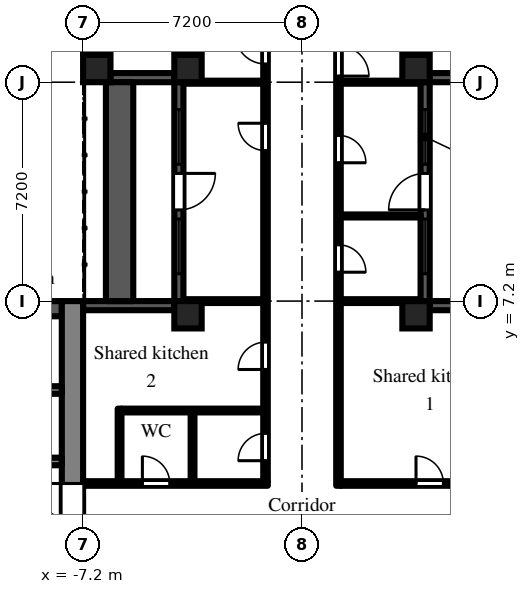
"""IFC4 building model, lengths in metres.
Left out: names, types, materials, properties, quantities, classifications, styles, units other than length and angle.
Written with IfcOpenShell. Run it as: python <this file> out.ifc"""

import sys

from ifc_helpers import new_model, si_unit, direction, frame, frame_2d, origin, origin_2d, place, context, subcontext, project, spatial, rectangle, extrude, element, fill, save


model = new_model("IFC4")
c1 = context("Model", 3, precision=1e-05, world=origin(), true_north=direction((0.0, 1.0)))
c2 = subcontext(c1, "Body", "Model", "MODEL_VIEW")
j1 = project(units=[si_unit("LENGTHUNIT", "METRE"), si_unit("PLANEANGLEUNIT", "RADIAN")], contexts=[c1])
p1 = place(None, origin())
s1 = spatial("IfcSite", under=j1, at=p1, CompositionType="ELEMENT")
p2 = place(p1, origin())
s2 = spatial("IfcBuilding", under=s1, at=p2, CompositionType="ELEMENT")
p3 = place(p2, frame((0.0, 0.0, 66.9)))
s3 = spatial("IfcBuildingStorey", under=s2, at=p3, CompositionType="ELEMENT", Elevation=66.9)
for number, where, z_axis, x_axis in (
    (1, (-6.75, 14.85, 0.0), (0.0, 0.0, 1.0), (1.0, 0.0, 0.0)),
    (2, (-3.75, 6.75, 0.0), (0.0, 0.0, 1.0), (1.0, 0.0, 0.0)),
    (3, (-3.75, 14.85, 0.0), (0.0, 0.0, 1.0), (1.0, 0.0, 0.0)),
    (4, (3.75, 6.75, 0.0), (0.0, 0.0, 1.0), (1.0, 0.0, 0.0)),
    (5, (3.75, 14.85, 0.0), (0.0, 0.0, 1.0), (1.0, 0.0, 0.0)),
):
    element("IfcColumn", number, at=place(p3, frame(where, z_axis=z_axis, x_axis=x_axis)), inside=s3, PredefinedType="COLUMN", context=c2, shape_type="SweptSolid", body=[
        extrude(rectangle(XDim=0.9, YDim=0.9, at=origin_2d()), origin(), (0.0, 0.0, 1.0), 3.0),
    ])
p4 = place(p3, frame((7.2, 7.05, 0.0), z_axis=(0.0, 0.0, 1.0), x_axis=(-1.0, 0.0, 0.0)))
e6 = element("IfcWall", 6, at=p4, inside=s3, PredefinedType="SOLIDWALL", context=c2, shape_type="SweptSolid", body=[
    extrude(rectangle(XDim=3.0, YDim=0.3, at=frame_2d((1.5, 0.0))), origin(), (0.0, 0.0, 1.0), 2.1),
])
p5 = place(p3, frame((4.05, 7.2, 0.0), z_axis=(0.0, 0.0, 1.0), x_axis=(0.0, 1.0, 0.0)))
e7 = element("IfcWall", 7, at=p5, inside=s3, PredefinedType="SOLIDWALL", context=c2, shape_type="SweptSolid", body=[
    extrude(rectangle(XDim=7.2, YDim=0.3, at=frame_2d((3.6, 0.0))), origin(), (0.0, 0.0, 1.0), 2.1),
])
p6 = place(p5, frame((3.0, 0.0, 0.0)))
e8 = element("IfcOpeningElement", 8, at=p6, cuts=e7, PredefinedType="OPENING", context=c2, shape_type="SweptSolid", body=[
    extrude(rectangle(XDim=1.2, YDim=2.05, at=frame_2d((0.6, 1.025))), frame((0.0, 0.16, 0.0), z_axis=(0.0, -1.0, 0.0), x_axis=(1.0, 0.0, 0.0)), (0.0, 0.0, 1.0), 0.32),
])
p7 = place(p5, frame((0.9, 0.0, 0.2)))
e9 = element("IfcOpeningElement", 9, at=p7, cuts=e7, PredefinedType="OPENING", context=c2, shape_type="SweptSolid", body=[
    extrude(rectangle(XDim=1.8, YDim=1.85, at=frame_2d((0.9, 0.925))), frame((0.0, 0.16, 0.0), z_axis=(0.0, -1.0, 0.0), x_axis=(1.0, 0.0, 0.0)), (0.0, 0.0, 1.0), 0.32),
])
p8 = place(p5, frame((4.5, 0.0, 0.2)))
e10 = element("IfcOpeningElement", 10, at=p8, cuts=e7, PredefinedType="OPENING", context=c2, shape_type="SweptSolid", body=[
    extrude(rectangle(XDim=1.8, YDim=1.85, at=frame_2d((0.9, 0.925))), frame((0.0, 0.16, 0.0), z_axis=(0.0, -1.0, 0.0), x_axis=(1.0, 0.0, 0.0)), (0.0, 0.0, 1.0), 0.32),
])
p9 = place(p3, frame((4.2, 14.55, 0.0), z_axis=(0.0, 0.0, 1.0), x_axis=(1.0, 0.0, 0.0)))
e11 = element("IfcWall", 11, at=p9, inside=s3, PredefinedType="SOLIDWALL", context=c2, shape_type="SweptSolid", body=[
    extrude(rectangle(XDim=2.1, YDim=0.3, at=frame_2d((1.05, 0.0))), origin(), (0.0, 0.0, 1.0), 2.1),
])
p10 = place(p3, frame((-7.05, 17.1, 0.0), z_axis=(0.0, 0.0, 1.0), x_axis=(0.0, -1.0, 0.0)))
e12 = element("IfcWall", 12, at=p10, inside=s3, PredefinedType="SOLIDWALL", context=c2, shape_type="SweptSolid", body=[
    extrude(rectangle(XDim=1.8, YDim=0.3, at=frame_2d((0.9, 0.0))), origin(), (0.0, 0.0, 1.0), 2.1),
])
p11 = place(p10, frame((0.3, 0.0, 0.2)))
e13 = element("IfcOpeningElement", 13, at=p11, cuts=e12, PredefinedType="OPENING", context=c2, shape_type="SweptSolid", body=[
    extrude(rectangle(XDim=1.2, YDim=1.85, at=frame_2d((0.6, 0.925))), frame((0.0, 0.16, 0.0), z_axis=(0.0, -1.0, 0.0), x_axis=(1.0, 0.0, 0.0)), (0.0, 0.0, 1.0), 0.32),
])
p12 = place(p3, frame((-6.3, 14.55, 0.0), z_axis=(0.0, 0.0, 1.0), x_axis=(1.0, 0.0, 0.0)))
e14 = element("IfcWall", 14, at=p12, inside=s3, PredefinedType="SOLIDWALL", context=c2, shape_type="SweptSolid", body=[
    extrude(rectangle(XDim=2.1, YDim=0.3, at=frame_2d((1.05, 0.0))), origin(), (0.0, 0.0, 1.0), 2.1),
])
p13 = place(p3, frame((-4.05, 14.4, 0.0), z_axis=(0.0, 0.0, 1.0), x_axis=(0.0, -1.0, 0.0)))
e15 = element("IfcWall", 15, at=p13, inside=s3, PredefinedType="SOLIDWALL", context=c2, shape_type="SweptSolid", body=[
    extrude(rectangle(XDim=7.2, YDim=0.3, at=frame_2d((3.6, 0.0))), origin(), (0.0, 0.0, 1.0), 2.1),
])
p14 = place(p13, frame((3.0, 0.0, 0.0)))
e16 = element("IfcOpeningElement", 16, at=p14, cuts=e15, PredefinedType="OPENING", context=c2, shape_type="SweptSolid", body=[
    extrude(rectangle(XDim=1.2, YDim=2.05, at=frame_2d((0.6, 1.025))), frame((0.0, 0.16, 0.0), z_axis=(0.0, -1.0, 0.0), x_axis=(1.0, 0.0, 0.0)), (0.0, 0.0, 1.0), 0.32),
])
p15 = place(p13, frame((0.9, 0.0, 0.2)))
e17 = element("IfcOpeningElement", 17, at=p15, cuts=e15, PredefinedType="OPENING", context=c2, shape_type="SweptSolid", body=[
    extrude(rectangle(XDim=1.8, YDim=1.85, at=frame_2d((0.9, 0.925))), frame((0.0, 0.16, 0.0), z_axis=(0.0, -1.0, 0.0), x_axis=(1.0, 0.0, 0.0)), (0.0, 0.0, 1.0), 0.32),
])
p16 = place(p13, frame((4.5, 0.0, 0.2)))
e18 = element("IfcOpeningElement", 18, at=p16, cuts=e15, PredefinedType="OPENING", context=c2, shape_type="SweptSolid", body=[
    extrude(rectangle(XDim=1.8, YDim=1.85, at=frame_2d((0.9, 0.925))), frame((0.0, 0.16, 0.0), z_axis=(0.0, -1.0, 0.0), x_axis=(1.0, 0.0, 0.0)), (0.0, 0.0, 1.0), 0.32),
])
p17 = place(p3, frame((-4.2, 7.05, 0.0), z_axis=(0.0, 0.0, 1.0), x_axis=(-1.0, 0.0, 0.0)))
e19 = element("IfcWall", 19, at=p17, inside=s3, PredefinedType="SOLIDWALL", context=c2, shape_type="SweptSolid", body=[
    extrude(rectangle(XDim=3.0, YDim=0.3, at=frame_2d((1.5, 0.0))), origin(), (0.0, 0.0, 1.0), 2.1),
])
p18 = place(p3, frame((-6.0, 7.2, 0.0), z_axis=(0.0, 0.0, 1.0), x_axis=(0.0, 1.0, 0.0)))
e20 = element("IfcWall", 20, at=p18, inside=s3, PredefinedType="PARAPET", context=c2, shape_type="SweptSolid", body=[
    extrude(rectangle(XDim=7.2, YDim=0.9, at=frame_2d((3.6, 0.0))), origin(), (0.0, 0.0, 1.0), 0.8),
])
p19 = place(p3, frame((-7.55, -7.2, 0.0), z_axis=(0.0, 0.0, 1.0), x_axis=(0.0, 1.0, 0.0)))
e21 = element("IfcWall", 21, at=p19, inside=s3, PredefinedType="SHEAR", context=c2, shape_type="SweptSolid", body=[
    extrude(rectangle(XDim=14.4, YDim=0.7, at=frame_2d((7.2, 0.0))), origin(), (0.0, 0.0, 1.0), 2.575),
])
p20 = place(p19, frame((6.0, 0.0, 0.0)))
e22 = element("IfcOpeningElement", 22, at=p20, cuts=e21, PredefinedType="OPENING", context=c2, shape_type="SweptSolid", body=[
    extrude(rectangle(XDim=2.4, YDim=2.2, at=frame_2d((1.2, 1.1))), frame((0.0, 0.36, 0.0), z_axis=(0.0, -1.0, 0.0), x_axis=(1.0, 0.0, 0.0)), (0.0, 0.0, 1.0), 0.72),
])
p21 = place(p3, frame((-7.9, 6.95, 0.0), z_axis=(0.0, 0.0, 1.0), x_axis=(-1.0, 0.0, 0.0)))
e23 = element("IfcWall", 23, at=p21, inside=s3, PredefinedType="SHEAR", context=c2, shape_type="SweptSolid", body=[
    extrude(rectangle(XDim=12.95, YDim=0.5, at=frame_2d((6.475, 0.0))), origin(), (0.0, 0.0, 1.0), 2.575),
])
p22 = place(p3, frame((-7.9, 1.925, 0.0), z_axis=(0.0, 0.0, 1.0), x_axis=(-1.0, 0.0, 0.0)))
e24 = element("IfcWall", 24, at=p22, inside=s3, PredefinedType="SHEAR", context=c2, shape_type="SweptSolid", body=[
    extrude(rectangle(XDim=12.95, YDim=0.25, at=frame_2d((6.475, 0.0))), origin(), (0.0, 0.0, 1.0), 2.575),
])
p23 = place(p22, frame((0.525, 0.0, 0.0)))
e25 = element("IfcOpeningElement", 25, at=p23, cuts=e24, PredefinedType="OPENING", context=c2, shape_type="SweptSolid", body=[
    extrude(rectangle(XDim=0.9, YDim=2.1, at=frame_2d((0.45, 1.05))), frame((0.0, 0.135, 0.0), z_axis=(0.0, -1.0, 0.0), x_axis=(1.0, 0.0, 0.0)), (0.0, 0.0, 1.0), 0.27),
])
p24 = place(p22, frame((2.625, 0.0, 0.0)))
e26 = element("IfcOpeningElement", 26, at=p24, cuts=e24, PredefinedType="OPENING", context=c2, shape_type="SweptSolid", body=[
    extrude(rectangle(XDim=1.1, YDim=2.1, at=frame_2d((0.55, 1.05))), frame((0.0, 0.135, 0.0), z_axis=(0.0, -1.0, 0.0), x_axis=(1.0, 0.0, 0.0)), (0.0, 0.0, 1.0), 0.27),
])
p25 = place(p22, frame((7.125, 0.0, 0.0)))
e27 = element("IfcOpeningElement", 27, at=p25, cuts=e24, PredefinedType="OPENING", context=c2, shape_type="SweptSolid", body=[
    extrude(rectangle(XDim=0.9, YDim=2.1, at=frame_2d((0.45, 1.05))), frame((0.0, 0.135, 0.0), z_axis=(0.0, -1.0, 0.0), x_axis=(1.0, 0.0, 0.0)), (0.0, 0.0, 1.0), 0.27),
])
p26 = place(p3, frame((-7.9, 4.275, 0.0), z_axis=(0.0, 0.0, 1.0), x_axis=(-1.0, 0.0, 0.0)))
e28 = element("IfcWall", 28, at=p26, inside=s3, PredefinedType="SHEAR", context=c2, shape_type="SweptSolid", body=[
    extrude(rectangle(XDim=1.95, YDim=0.25, at=frame_2d((0.975, 0.0))), origin(), (0.0, 0.0, 1.0), 2.575),
])
p27 = place(p3, frame((-7.2, 1.2, 0.0), z_axis=(0.0, 0.0, 1.0), x_axis=(1.0, 0.0, 0.0)))
e29 = element("IfcWall", 29, at=p27, inside=s3, PredefinedType="PARTITIONING", context=c2, shape_type="SweptSolid", body=[
    extrude(rectangle(XDim=6.075, YDim=0.15, at=frame_2d((3.038, 0.0))), origin(), (0.0, 0.0, 1.0), 2.575),
])
p28 = place(p27, frame((1.95, 0.0, 0.0)))
e30 = element("IfcOpeningElement", 30, at=p28, cuts=e29, PredefinedType="OPENING", context=c2, shape_type="SweptSolid", body=[
    extrude(rectangle(XDim=0.9, YDim=2.1, at=frame_2d((0.45, 1.05))), frame((0.0, 0.085, 0.0), z_axis=(0.0, -1.0, 0.0), x_axis=(1.0, 0.0, 0.0)), (0.0, 0.0, 1.0), 0.17),
])
p29 = place(p3, frame((-6.0, 1.275, 0.0), z_axis=(0.0, 0.0, 1.0), x_axis=(0.0, 1.0, 0.0)))
e31 = element("IfcWall", 31, at=p29, inside=s3, PredefinedType="PARTITIONING", context=c2, shape_type="SweptSolid", body=[
    extrude(rectangle(XDim=2.388, YDim=0.125, at=frame_2d((1.194, 0.0))), origin(), (0.0, 0.0, 1.0), 2.575),
])
p30 = place(p3, frame((-5.938, 3.6, 0.0), z_axis=(0.0, 0.0, 1.0), x_axis=(1.0, 0.0, 0.0)))
e32 = element("IfcWall", 32, at=p30, inside=s3, PredefinedType="PARTITIONING", context=c2, shape_type="SweptSolid", body=[
    extrude(rectangle(XDim=4.663, YDim=0.125, at=frame_2d((2.331, 0.0))), origin(), (0.0, 0.0, 1.0), 2.575),
])
p31 = place(p3, frame((-3.9, 7.2, 0.0), z_axis=(0.0, 0.0, 1.0), x_axis=(1.0, 0.0, 0.0)))
e33 = element("IfcWall", 33, at=p31, inside=s3, PredefinedType="PARTITIONING", context=c2, shape_type="SweptSolid", body=[
    extrude(rectangle(XDim=2.625, YDim=0.125, at=frame_2d((1.312, 0.0))), origin(), (0.0, 0.0, 1.0), 2.575),
])
p32 = place(p3, frame((-3.9, 14.4, 0.0), z_axis=(0.0, 0.0, 1.0), x_axis=(1.0, 0.0, 0.0)))
e34 = element("IfcWall", 34, at=p32, inside=s3, PredefinedType="PARTITIONING", context=c2, shape_type="SweptSolid", body=[
    extrude(rectangle(XDim=2.625, YDim=0.1, at=frame_2d((1.312, 0.0))), origin(), (0.0, 0.0, 1.0), 2.575),
])
p33 = place(p3, frame((-3.6, 1.275, 0.0), z_axis=(0.0, 0.0, 1.0), x_axis=(0.0, 1.0, 0.0)))
e35 = element("IfcWall", 35, at=p33, inside=s3, PredefinedType="PARTITIONING", context=c2, shape_type="SweptSolid", body=[
    extrude(rectangle(XDim=2.263, YDim=0.125, at=frame_2d((1.131, 0.0))), origin(), (0.0, 0.0, 1.0), 2.575),
])
p34 = place(p3, frame((-1.2, 1.275, 0.0), z_axis=(0.0, 0.0, 1.0), x_axis=(0.0, 1.0, 0.0)))
e36 = element("IfcWall", 36, at=p34, inside=s3, PredefinedType="PARTITIONING", context=c2, shape_type="SweptSolid", body=[
    extrude(rectangle(XDim=16.65, YDim=0.15, at=frame_2d((8.325, 0.0))), origin(), (0.0, 0.0, 1.0), 2.575),
])
p35 = place(p34, frame((0.675, 0.0, 0.0)))
e37 = element("IfcOpeningElement", 37, at=p35, cuts=e36, PredefinedType="OPENING", context=c2, shape_type="SweptSolid", body=[
    extrude(rectangle(XDim=0.9, YDim=2.1, at=frame_2d((0.45, 1.05))), frame((0.0, 0.085, 0.0), z_axis=(0.0, -1.0, 0.0), x_axis=(1.0, 0.0, 0.0)), (0.0, 0.0, 1.0), 0.17),
])
p36 = place(p34, frame((3.675, 0.0, 0.0)))
e38 = element("IfcOpeningElement", 38, at=p36, cuts=e36, PredefinedType="OPENING", context=c2, shape_type="SweptSolid", body=[
    extrude(rectangle(XDim=0.9, YDim=2.1, at=frame_2d((0.45, 1.05))), frame((0.0, 0.085, 0.0), z_axis=(0.0, -1.0, 0.0), x_axis=(1.0, 0.0, 0.0)), (0.0, 0.0, 1.0), 0.17),
])
p37 = place(p34, frame((10.875, 0.0, 0.0)))
e39 = element("IfcOpeningElement", 39, at=p37, cuts=e36, PredefinedType="OPENING", context=c2, shape_type="SweptSolid", body=[
    extrude(rectangle(XDim=0.9, YDim=2.1, at=frame_2d((0.45, 1.05))), frame((0.0, 0.085, 0.0), z_axis=(0.0, -1.0, 0.0), x_axis=(1.0, 0.0, 0.0)), (0.0, 0.0, 1.0), 0.17),
])
p38 = place(p34, frame((13.725, 0.0, 0.0)))
e40 = element("IfcOpeningElement", 40, at=p38, cuts=e36, PredefinedType="OPENING", context=c2, shape_type="SweptSolid", body=[
    extrude(rectangle(XDim=1.0, YDim=2.1, at=frame_2d((0.5, 1.05))), frame((0.0, 0.085, 0.0), z_axis=(0.0, -1.0, 0.0), x_axis=(1.0, 0.0, 0.0)), (0.0, 0.0, 1.0), 0.17),
])
p39 = place(p3, frame((1.2, 1.125, 0.0), z_axis=(0.0, 0.0, 1.0), x_axis=(0.0, 1.0, 0.0)))
e41 = element("IfcWall", 41, at=p39, inside=s3, PredefinedType="PARTITIONING", context=c2, shape_type="SweptSolid", body=[
    extrude(rectangle(XDim=16.8, YDim=0.15, at=frame_2d((8.4, 0.0))), origin(), (0.0, 0.0, 1.0), 2.575),
])
p40 = place(p39, frame((7.025, 0.0, 0.0)))
e42 = element("IfcOpeningElement", 42, at=p40, cuts=e41, PredefinedType="OPENING", context=c2, shape_type="SweptSolid", body=[
    extrude(rectangle(XDim=0.9, YDim=2.1, at=frame_2d((0.45, 1.05))), frame((0.0, 0.085, 0.0), z_axis=(0.0, -1.0, 0.0), x_axis=(1.0, 0.0, 0.0)), (0.0, 0.0, 1.0), 0.17),
])
p41 = place(p39, frame((10.625, 0.0, 0.0)))
e43 = element("IfcOpeningElement", 43, at=p41, cuts=e41, PredefinedType="OPENING", context=c2, shape_type="SweptSolid", body=[
    extrude(rectangle(XDim=0.9, YDim=2.1, at=frame_2d((0.45, 1.05))), frame((0.0, 0.085, 0.0), z_axis=(0.0, -1.0, 0.0), x_axis=(1.0, 0.0, 0.0)), (0.0, 0.0, 1.0), 0.17),
])
p42 = place(p39, frame((13.475, 0.0, 0.0)))
e44 = element("IfcOpeningElement", 44, at=p42, cuts=e41, PredefinedType="OPENING", context=c2, shape_type="SweptSolid", body=[
    extrude(rectangle(XDim=1.0, YDim=2.1, at=frame_2d((0.5, 1.05))), frame((0.0, 0.085, 0.0), z_axis=(0.0, -1.0, 0.0), x_axis=(1.0, 0.0, 0.0)), (0.0, 0.0, 1.0), 0.17),
])
p43 = place(p3, frame((1.275, 1.2, 0.0), z_axis=(0.0, 0.0, 1.0), x_axis=(1.0, 0.0, 0.0)))
e45 = element("IfcWall", 45, at=p43, inside=s3, PredefinedType="PARTITIONING", context=c2, shape_type="SweptSolid", body=[
    extrude(rectangle(XDim=5.925, YDim=0.15, at=frame_2d((2.962, 0.0))), origin(), (0.0, 0.0, 1.0), 2.575),
])
p44 = place(p43, frame((2.475, 0.0, 0.0)))
e46 = element("IfcOpeningElement", 46, at=p44, cuts=e45, PredefinedType="OPENING", context=c2, shape_type="SweptSolid", body=[
    extrude(rectangle(XDim=0.9, YDim=2.1, at=frame_2d((0.45, 1.05))), frame((0.0, 0.085, 0.0), z_axis=(0.0, -1.0, 0.0), x_axis=(1.0, 0.0, 0.0)), (0.0, 0.0, 1.0), 0.17),
])
p45 = place(p3, frame((1.275, 7.2, 0.0), z_axis=(0.0, 0.0, 1.0), x_axis=(1.0, 0.0, 0.0)))
e47 = element("IfcWall", 47, at=p45, inside=s3, PredefinedType="PARTITIONING", context=c2, shape_type="SweptSolid", body=[
    extrude(rectangle(XDim=2.625, YDim=0.125, at=frame_2d((1.312, 0.0))), origin(), (0.0, 0.0, 1.0), 2.575),
])
for number, where, z_axis, x_axis in (
    (48, (1.275, 10.0, 0.0), (0.0, 0.0, 1.0), (1.0, 0.0, 0.0)),
    (49, (1.275, 14.4, 0.0), (0.0, 0.0, 1.0), (1.0, 0.0, 0.0)),
):
    element("IfcWall", number, at=place(p3, frame(where, z_axis=z_axis, x_axis=x_axis)), inside=s3, PredefinedType="PARTITIONING", context=c2, shape_type="SweptSolid", body=[
        extrude(rectangle(XDim=2.625, YDim=0.1, at=frame_2d((1.312, 0.0))), origin(), (0.0, 0.0, 1.0), 2.575),
    ])
p46 = place(p6, origin())
e50 = element("IfcDoor", 50, at=p46, inside=s3, OperationType="SINGLE_SWING_LEFT", PredefinedType="DOOR", context=c2, shape_type="SweptSolid", body=[
    extrude(rectangle(XDim=1.2, YDim=2.05, at=frame_2d((0.6, 1.025))), frame((0.0, 0.025, 0.0), z_axis=(0.0, -1.0, 0.0), x_axis=(1.0, 0.0, 0.0)), (0.0, 0.0, 1.0), 0.05),
])
fill(e8, e50)
p47 = place(p7, origin())
e51 = element("IfcWindow", 51, at=p47, inside=s3, PartitioningType="SINGLE_PANEL", PredefinedType="WINDOW", context=c2, shape_type="SweptSolid", body=[
    extrude(rectangle(XDim=1.8, YDim=1.85, at=frame_2d((0.9, 0.925))), frame((0.0, 0.03, 0.0), z_axis=(0.0, -1.0, 0.0), x_axis=(1.0, 0.0, 0.0)), (0.0, 0.0, 1.0), 0.06),
])
fill(e9, e51)
p48 = place(p8, origin())
e52 = element("IfcWindow", 52, at=p48, inside=s3, PartitioningType="SINGLE_PANEL", PredefinedType="WINDOW", context=c2, shape_type="SweptSolid", body=[
    extrude(rectangle(XDim=1.8, YDim=1.85, at=frame_2d((0.9, 0.925))), frame((0.0, 0.03, 0.0), z_axis=(0.0, -1.0, 0.0), x_axis=(1.0, 0.0, 0.0)), (0.0, 0.0, 1.0), 0.06),
])
fill(e10, e52)
p49 = place(p14, origin())
e53 = element("IfcDoor", 53, at=p49, inside=s3, OperationType="SINGLE_SWING_LEFT", PredefinedType="DOOR", context=c2, shape_type="SweptSolid", body=[
    extrude(rectangle(XDim=1.2, YDim=2.05, at=frame_2d((0.6, 1.025))), frame((0.0, 0.025, 0.0), z_axis=(0.0, -1.0, 0.0), x_axis=(1.0, 0.0, 0.0)), (0.0, 0.0, 1.0), 0.05),
])
fill(e16, e53)
p50 = place(p15, origin())
e54 = element("IfcWindow", 54, at=p50, inside=s3, PartitioningType="SINGLE_PANEL", PredefinedType="WINDOW", context=c2, shape_type="SweptSolid", body=[
    extrude(rectangle(XDim=1.8, YDim=1.85, at=frame_2d((0.9, 0.925))), frame((0.0, 0.03, 0.0), z_axis=(0.0, -1.0, 0.0), x_axis=(1.0, 0.0, 0.0)), (0.0, 0.0, 1.0), 0.06),
])
fill(e17, e54)
p51 = place(p16, origin())
e55 = element("IfcWindow", 55, at=p51, inside=s3, PartitioningType="SINGLE_PANEL", PredefinedType="WINDOW", context=c2, shape_type="SweptSolid", body=[
    extrude(rectangle(XDim=1.8, YDim=1.85, at=frame_2d((0.9, 0.925))), frame((0.0, 0.03, 0.0), z_axis=(0.0, -1.0, 0.0), x_axis=(1.0, 0.0, 0.0)), (0.0, 0.0, 1.0), 0.06),
])
fill(e18, e55)
p52 = place(p20, origin())
e56 = element("IfcDoor", 56, at=p52, inside=s3, OperationType="DOUBLE_DOOR_DOUBLE_SWING", PredefinedType="DOOR", context=c2, shape_type="SweptSolid", body=[
    extrude(rectangle(XDim=2.4, YDim=2.2, at=frame_2d((1.2, 1.1))), frame((0.0, 0.025, 0.0), z_axis=(0.0, -1.0, 0.0), x_axis=(1.0, 0.0, 0.0)), (0.0, 0.0, 1.0), 0.05),
])
fill(e22, e56)
p53 = place(p44, origin())
e57 = element("IfcDoor", 57, at=p53, inside=s3, OperationType="SINGLE_SWING_LEFT", PredefinedType="DOOR", context=c2, shape_type="SweptSolid", body=[
    extrude(rectangle(XDim=0.9, YDim=2.1, at=frame_2d((0.45, 1.05))), frame((0.0, 0.025, 0.0), z_axis=(0.0, -1.0, 0.0), x_axis=(1.0, 0.0, 0.0)), (0.0, 0.0, 1.0), 0.05),
])
fill(e46, e57)
p54 = place(p35, origin())
e58 = element("IfcDoor", 58, at=p54, inside=s3, OperationType="SINGLE_SWING_LEFT", PredefinedType="DOOR", context=c2, shape_type="SweptSolid", body=[
    extrude(rectangle(XDim=0.9, YDim=2.1, at=frame_2d((0.45, 1.05))), frame((0.0, 0.025, 0.0), z_axis=(0.0, -1.0, 0.0), x_axis=(1.0, 0.0, 0.0)), (0.0, 0.0, 1.0), 0.05),
])
fill(e37, e58)
p55 = place(p28, origin())
e59 = element("IfcDoor", 59, at=p55, inside=s3, OperationType="SINGLE_SWING_LEFT", PredefinedType="DOOR", context=c2, shape_type="SweptSolid", body=[
    extrude(rectangle(XDim=0.9, YDim=2.1, at=frame_2d((0.45, 1.05))), frame((0.0, 0.025, 0.0), z_axis=(0.0, -1.0, 0.0), x_axis=(1.0, 0.0, 0.0)), (0.0, 0.0, 1.0), 0.05),
])
fill(e30, e59)
p56 = place(p36, origin())
e60 = element("IfcDoor", 60, at=p56, inside=s3, OperationType="SINGLE_SWING_LEFT", PredefinedType="DOOR", context=c2, shape_type="SweptSolid", body=[
    extrude(rectangle(XDim=0.9, YDim=2.1, at=frame_2d((0.45, 1.05))), frame((0.0, 0.025, 0.0), z_axis=(0.0, -1.0, 0.0), x_axis=(1.0, 0.0, 0.0)), (0.0, 0.0, 1.0), 0.05),
])
fill(e38, e60)
p57 = place(p37, origin())
e61 = element("IfcDoor", 61, at=p57, inside=s3, OperationType="SINGLE_SWING_RIGHT", PredefinedType="DOOR", context=c2, shape_type="SweptSolid", body=[
    extrude(rectangle(XDim=0.9, YDim=2.1, at=frame_2d((0.45, 1.05))), frame((0.0, 0.025, 0.0), z_axis=(0.0, -1.0, 0.0), x_axis=(1.0, 0.0, 0.0)), (0.0, 0.0, 1.0), 0.05),
])
fill(e39, e61)
p58 = place(p38, origin())
e62 = element("IfcDoor", 62, at=p58, inside=s3, OperationType="SINGLE_SWING_RIGHT", PredefinedType="DOOR", context=c2, shape_type="SweptSolid", body=[
    extrude(rectangle(XDim=1.0, YDim=2.1, at=frame_2d((0.5, 1.05))), frame((0.0, 0.025, 0.0), z_axis=(0.0, -1.0, 0.0), x_axis=(1.0, 0.0, 0.0)), (0.0, 0.0, 1.0), 0.05),
])
fill(e40, e62)
p59 = place(p40, frame((0.9, 0.0, 0.0), z_axis=(0.0, 0.0, 1.0), x_axis=(-1.0, 0.0, 0.0)))
e63 = element("IfcDoor", 63, at=p59, inside=s3, OperationType="SINGLE_SWING_RIGHT", PredefinedType="DOOR", context=c2, shape_type="SweptSolid", body=[
    extrude(rectangle(XDim=0.9, YDim=2.1, at=frame_2d((0.45, 1.05))), frame((0.0, 0.025, 0.0), z_axis=(0.0, -1.0, 0.0), x_axis=(1.0, 0.0, 0.0)), (0.0, 0.0, 1.0), 0.05),
])
fill(e42, e63)
p60 = place(p41, frame((0.9, 0.0, 0.0), z_axis=(0.0, 0.0, 1.0), x_axis=(-1.0, 0.0, 0.0)))
e64 = element("IfcDoor", 64, at=p60, inside=s3, OperationType="SINGLE_SWING_RIGHT", PredefinedType="DOOR", context=c2, shape_type="SweptSolid", body=[
    extrude(rectangle(XDim=0.9, YDim=2.1, at=frame_2d((0.45, 1.05))), frame((0.0, 0.025, 0.0), z_axis=(0.0, -1.0, 0.0), x_axis=(1.0, 0.0, 0.0)), (0.0, 0.0, 1.0), 0.05),
])
fill(e43, e64)
p61 = place(p42, frame((1.0, 0.0, 0.0), z_axis=(0.0, 0.0, 1.0), x_axis=(-1.0, 0.0, 0.0)))
e65 = element("IfcDoor", 65, at=p61, inside=s3, OperationType="SINGLE_SWING_RIGHT", PredefinedType="DOOR", context=c2, shape_type="SweptSolid", body=[
    extrude(rectangle(XDim=1.0, YDim=2.1, at=frame_2d((0.5, 1.05))), frame((0.0, 0.025, 0.0), z_axis=(0.0, -1.0, 0.0), x_axis=(1.0, 0.0, 0.0)), (0.0, 0.0, 1.0), 0.05),
])
fill(e44, e65)
save(model, sys.argv[1])
